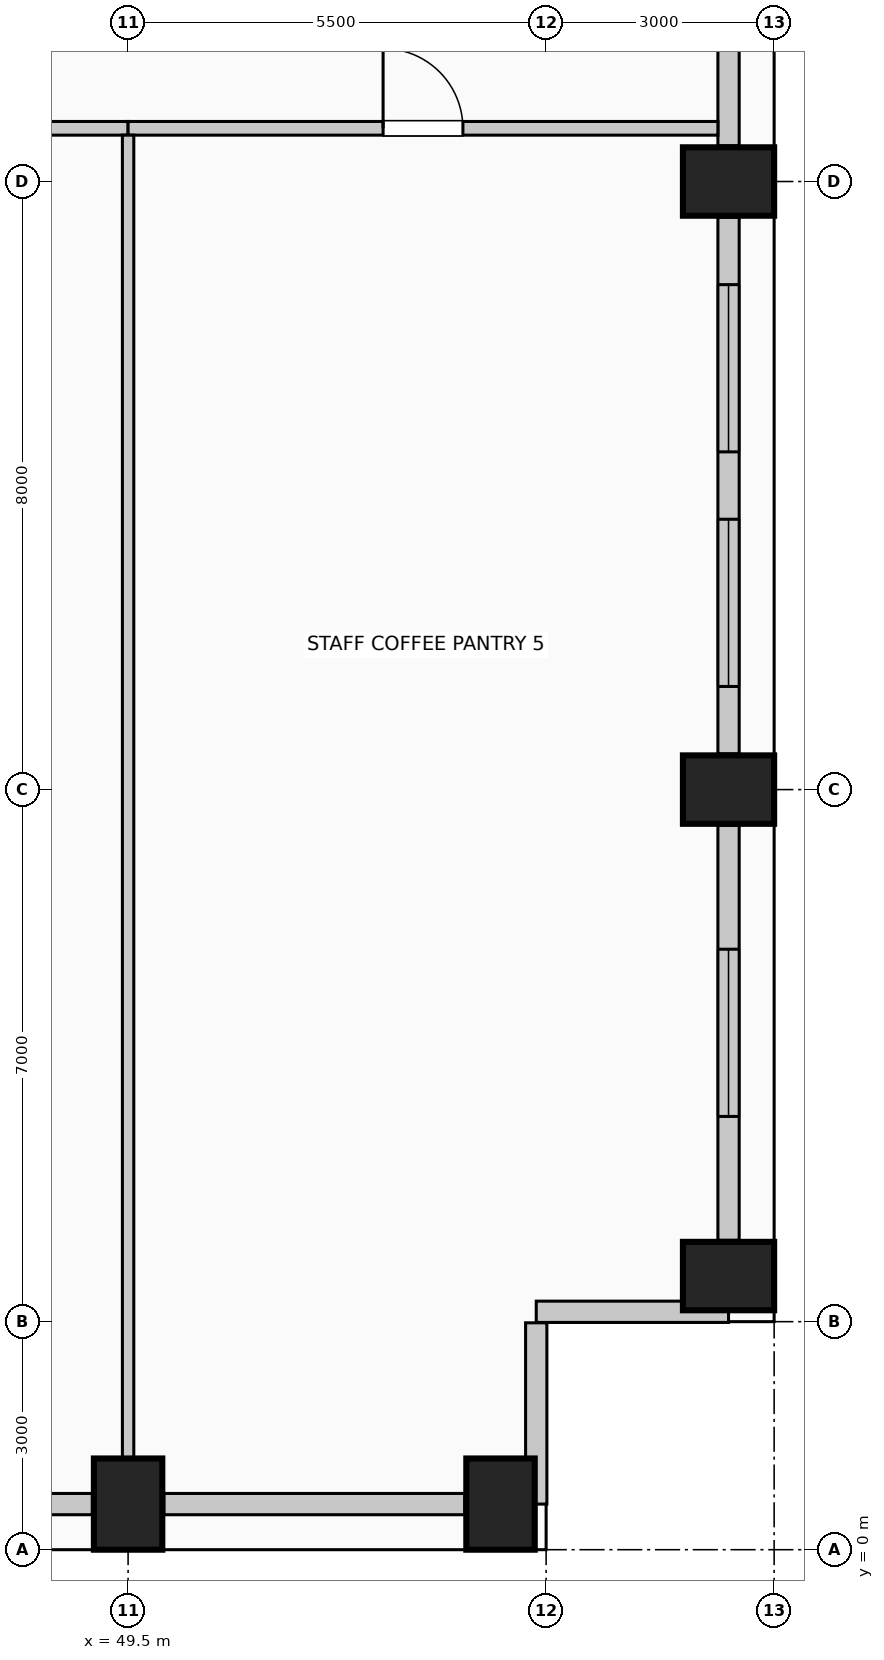
"""IFC4 building model, lengths in metres.
Left out: names, types, materials, properties, quantities, classifications, styles, units other than length and angle.
Written with IfcOpenShell. Run it as: python <this file> out.ifc"""

import sys

from ifc_helpers import new_model, si_unit, direction, frame, frame_2d, origin, origin_2d, place, context, subcontext, project, spatial, rectangle, extrude, element, fill, save


model = new_model("IFC4")
c1 = context("Model", 3, precision=1e-05, world=origin(), true_north=direction((0.0, 1.0)))
c2 = subcontext(c1, "Body", "Model", "MODEL_VIEW")
j1 = project(units=[si_unit("LENGTHUNIT", "METRE"), si_unit("PLANEANGLEUNIT", "RADIAN")], contexts=[c1])
p1 = place(None, origin())
s1 = spatial("IfcSite", under=j1, at=p1, CompositionType="ELEMENT")
p2 = place(p1, origin())
s2 = spatial("IfcBuilding", under=s1, at=p2, CompositionType="ELEMENT")
p3 = place(p2, frame((0.0, 0.0, 66.6)))
s3 = spatial("IfcBuildingStorey", under=s2, at=p3, CompositionType="ELEMENT", Elevation=66.6)
for number, where, z_axis, x_axis in (
    (1, (49.5, 0.6, 0.0), (0.0, 0.0, 1.0), (1.0, 0.0, 0.0)),
    (2, (54.4, 0.6, 0.0), (0.0, 0.0, 1.0), (1.0, 0.0, 0.0)),
    (3, (57.4, 3.6, 0.0), (0.0, 0.0, 1.0), (0.0, 1.0, 0.0)),
    (4, (57.4, 10.0, 0.0), (0.0, 0.0, 1.0), (0.0, 1.0, 0.0)),
    (5, (57.4, 18.0, 0.0), (0.0, 0.0, 1.0), (0.0, 1.0, 0.0)),
):
    element("IfcColumn", number, at=place(p3, frame(where, z_axis=z_axis, x_axis=x_axis)), inside=s3, PredefinedType="COLUMN", context=c2, shape_type="SweptSolid", body=[
        extrude(rectangle(XDim=0.9, YDim=1.2, at=origin_2d()), origin(), (0.0, 0.0, 1.0), 4.0),
    ])
p4 = place(p3, frame((49.03, 0.6, 0.0), z_axis=(0.0, 0.0, 1.0), x_axis=(-1.0, 0.0, 0.0)))
e6 = element("IfcWall", 6, at=p4, inside=s3, PredefinedType="SOLIDWALL", context=c2, shape_type="SweptSolid", body=[
    extrude(rectangle(XDim=4.56, YDim=0.28, at=frame_2d((2.28, 0.0))), origin(), (0.0, 0.0, 1.0), 2.85),
])
p5 = place(p3, frame((53.93, 0.6, 0.0), z_axis=(0.0, 0.0, 1.0), x_axis=(-1.0, 0.0, 0.0)))
e7 = element("IfcWall", 7, at=p5, inside=s3, PredefinedType="SOLIDWALL", context=c2, shape_type="SweptSolid", body=[
    extrude(rectangle(XDim=3.96, YDim=0.28, at=frame_2d((1.98, 0.0))), origin(), (0.0, 0.0, 1.0), 2.85),
])
p6 = place(p3, frame((57.4, 9.53, 0.0), z_axis=(0.0, 0.0, 1.0), x_axis=(0.0, -1.0, 0.0)))
e8 = element("IfcWall", 8, at=p6, inside=s3, PredefinedType="SOLIDWALL", context=c2, shape_type="SweptSolid", body=[
    extrude(rectangle(XDim=5.46, YDim=0.28, at=frame_2d((2.73, 0.0))), origin(), (0.0, 0.0, 1.0), 2.85),
])
p7 = place(p6, frame((1.63, 0.0, 0.5)))
e9 = element("IfcOpeningElement", 9, at=p7, cuts=e8, PredefinedType="OPENING", context=c2, shape_type="SweptSolid", body=[
    extrude(rectangle(XDim=2.2, YDim=1.95, at=frame_2d((1.1, 0.975))), frame((0.0, 0.15, 0.0), z_axis=(0.0, -1.0, 0.0), x_axis=(1.0, 0.0, 0.0)), (0.0, 0.0, 1.0), 0.3),
])
p8 = place(p3, frame((57.4, 17.53, 0.0), z_axis=(0.0, 0.0, 1.0), x_axis=(0.0, -1.0, 0.0)))
e10 = element("IfcWall", 10, at=p8, inside=s3, PredefinedType="SOLIDWALL", context=c2, shape_type="SweptSolid", body=[
    extrude(rectangle(XDim=7.06, YDim=0.28, at=frame_2d((3.53, 0.0))), origin(), (0.0, 0.0, 1.0), 2.85),
])
p9 = place(p8, frame((0.887, 0.0, 0.5)))
e11 = element("IfcOpeningElement", 11, at=p9, cuts=e10, PredefinedType="OPENING", context=c2, shape_type="SweptSolid", body=[
    extrude(rectangle(XDim=2.2, YDim=1.95, at=frame_2d((1.1, 0.975))), frame((0.0, 0.15, 0.0), z_axis=(0.0, -1.0, 0.0), x_axis=(1.0, 0.0, 0.0)), (0.0, 0.0, 1.0), 0.3),
])
p10 = place(p8, frame((3.973, 0.0, 0.5)))
e12 = element("IfcOpeningElement", 12, at=p10, cuts=e10, PredefinedType="OPENING", context=c2, shape_type="SweptSolid", body=[
    extrude(rectangle(XDim=2.2, YDim=1.95, at=frame_2d((1.1, 0.975))), frame((0.0, 0.15, 0.0), z_axis=(0.0, -1.0, 0.0), x_axis=(1.0, 0.0, 0.0)), (0.0, 0.0, 1.0), 0.3),
])
p11 = place(p3, frame((57.4, 25.53, 0.0), z_axis=(0.0, 0.0, 1.0), x_axis=(0.0, -1.0, 0.0)))
e13 = element("IfcWall", 13, at=p11, inside=s3, PredefinedType="SOLIDWALL", context=c2, shape_type="SweptSolid", body=[
    extrude(rectangle(XDim=7.06, YDim=0.28, at=frame_2d((3.53, 0.0))), origin(), (0.0, 0.0, 1.0), 2.85),
])
p12 = place(p3, frame((57.4, 3.13, 0.0), z_axis=(0.0, 0.0, 1.0), x_axis=(-1.0, 0.0, 0.0)))
e14 = element("IfcWall", 14, at=p12, inside=s3, PredefinedType="SOLIDWALL", context=c2, shape_type="SweptSolid", body=[
    extrude(rectangle(XDim=2.53, YDim=0.28, at=frame_2d((1.265, 0.0))), origin(), (0.0, 0.0, 1.0), 3.7),
])
p13 = place(p3, frame((54.87, 2.985, 0.0), z_axis=(0.0, 0.0, 1.0), x_axis=(0.0, -1.0, 0.0)))
e15 = element("IfcWall", 15, at=p13, inside=s3, PredefinedType="SOLIDWALL", context=c2, shape_type="SweptSolid", body=[
    extrude(rectangle(XDim=2.385, YDim=0.28, at=frame_2d((1.192, 0.0))), origin(), (0.0, 0.0, 1.0), 3.7),
])
p14 = place(p3, frame((35.2, 18.7, 0.0), z_axis=(0.0, 0.0, 1.0), x_axis=(1.0, 0.0, 0.0)))
e16 = element("IfcWall", 16, at=p14, inside=s3, PredefinedType="PARTITIONING", context=c2, shape_type="SweptSolid", body=[
    extrude(rectangle(XDim=14.3, YDim=0.18, at=frame_2d((7.15, 0.0))), origin(), (0.0, 0.0, 1.0), 3.7),
])
p15 = place(p14, frame((8.295, 0.0, 0.0)))
e17 = element("IfcOpeningElement", 17, at=p15, cuts=e16, PredefinedType="OPENING", context=c2, shape_type="SweptSolid", body=[
    extrude(rectangle(XDim=0.95, YDim=2.15, at=frame_2d((0.475, 1.075))), frame((0.0, 0.1, 0.0), z_axis=(0.0, -1.0, 0.0), x_axis=(1.0, 0.0, 0.0)), (0.0, 0.0, 1.0), 0.2),
])
p16 = place(p3, frame((49.5, 18.7, 0.0), z_axis=(0.0, 0.0, 1.0), x_axis=(1.0, 0.0, 0.0)))
e18 = element("IfcWall", 18, at=p16, inside=s3, PredefinedType="PARTITIONING", context=c2, shape_type="SweptSolid", body=[
    extrude(rectangle(XDim=7.76, YDim=0.18, at=frame_2d((3.88, 0.0))), origin(), (0.0, 0.0, 1.0), 3.7),
])
p17 = place(p16, frame((3.355, 0.0, 0.0)))
e19 = element("IfcOpeningElement", 19, at=p17, cuts=e18, PredefinedType="OPENING", context=c2, shape_type="SweptSolid", body=[
    extrude(rectangle(XDim=1.05, YDim=2.15, at=frame_2d((0.525, 1.075))), frame((0.0, 0.1, 0.0), z_axis=(0.0, -1.0, 0.0), x_axis=(1.0, 0.0, 0.0)), (0.0, 0.0, 1.0), 0.2),
])
p18 = place(p3, frame((49.5, 1.2, 0.0), z_axis=(0.0, 0.0, 1.0), x_axis=(0.0, 1.0, 0.0)))
e20 = element("IfcWall", 20, at=p18, inside=s3, PredefinedType="PARTITIONING", context=c2, shape_type="SweptSolid", body=[
    extrude(rectangle(XDim=17.41, YDim=0.15, at=frame_2d((8.705, 0.0))), origin(), (0.0, 0.0, 1.0), 3.7),
])
p19 = place(p7, origin())
e21 = element("IfcWindow", 21, at=p19, inside=s3, PartitioningType="SINGLE_PANEL", PredefinedType="WINDOW", context=c2, shape_type="SweptSolid", body=[
    extrude(rectangle(XDim=2.2, YDim=1.95, at=frame_2d((1.1, 0.975))), frame((0.0, 0.03, 0.0), z_axis=(0.0, -1.0, 0.0), x_axis=(1.0, 0.0, 0.0)), (0.0, 0.0, 1.0), 0.06),
])
fill(e9, e21)
p20 = place(p9, origin())
e22 = element("IfcWindow", 22, at=p20, inside=s3, PartitioningType="SINGLE_PANEL", PredefinedType="WINDOW", context=c2, shape_type="SweptSolid", body=[
    extrude(rectangle(XDim=2.2, YDim=1.95, at=frame_2d((1.1, 0.975))), frame((0.0, 0.03, 0.0), z_axis=(0.0, -1.0, 0.0), x_axis=(1.0, 0.0, 0.0)), (0.0, 0.0, 1.0), 0.06),
])
fill(e11, e22)
p21 = place(p10, origin())
e23 = element("IfcWindow", 23, at=p21, inside=s3, PartitioningType="SINGLE_PANEL", PredefinedType="WINDOW", context=c2, shape_type="SweptSolid", body=[
    extrude(rectangle(XDim=2.2, YDim=1.95, at=frame_2d((1.1, 0.975))), frame((0.0, 0.03, 0.0), z_axis=(0.0, -1.0, 0.0), x_axis=(1.0, 0.0, 0.0)), (0.0, 0.0, 1.0), 0.06),
])
fill(e12, e23)
p22 = place(p17, origin())
e24 = element("IfcDoor", 24, at=p22, inside=s3, OperationType="SINGLE_SWING_LEFT", PredefinedType="DOOR", context=c2, shape_type="SweptSolid", body=[
    extrude(rectangle(XDim=1.05, YDim=2.15, at=frame_2d((0.525, 1.075))), frame((0.0, 0.025, 0.0), z_axis=(0.0, -1.0, 0.0), x_axis=(1.0, 0.0, 0.0)), (0.0, 0.0, 1.0), 0.05),
])
fill(e19, e24)
save(model, sys.argv[1])
